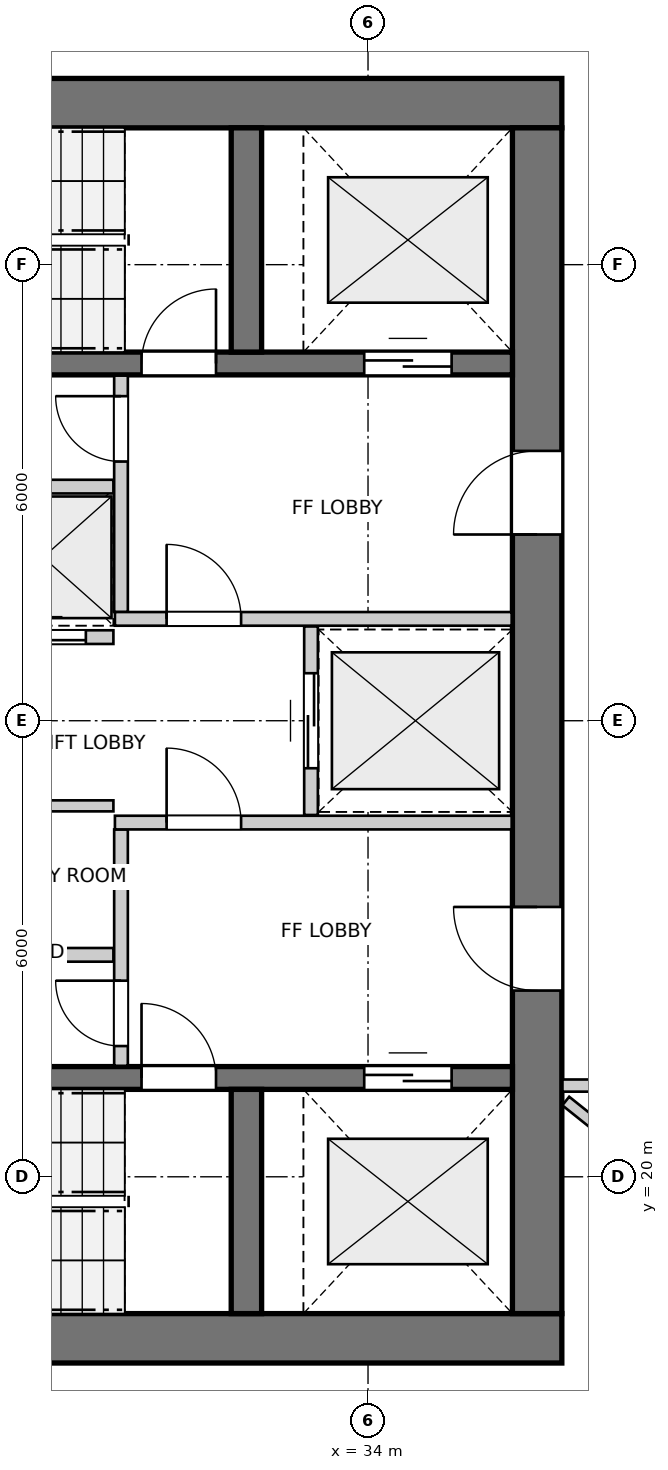
"""IFC4 building model, lengths in metres.
Left out: names, types, materials, properties, quantities, classifications, styles, units other than length and angle.
Written with IfcOpenShell. Run it as: python <this file> out.ifc"""

import sys

from ifc_helpers import new_model, si_unit, direction, frame, frame_2d, origin, place, context, subcontext, project, spatial, rectangle, extrude, source, transform, mapped, element, fill, save


model = new_model("IFC4")
c1 = context("Model", 3, precision=1e-05, world=origin(), true_north=direction((0.0, 1.0)))
c2 = subcontext(c1, "Body", "Model", "MODEL_VIEW")
j1 = project(units=[si_unit("LENGTHUNIT", "METRE"), si_unit("PLANEANGLEUNIT", "RADIAN")], contexts=[c1])
p1 = place(None, origin())
s1 = spatial("IfcSite", under=j1, at=p1, CompositionType="ELEMENT")
p2 = place(p1, origin())
s2 = spatial("IfcBuilding", under=s1, at=p2, CompositionType="ELEMENT")
p3 = place(p2, frame((0.0, 0.0, 139.4)))
s3 = spatial("IfcBuildingStorey", under=s2, at=p3, CompositionType="ELEMENT", Elevation=139.4)
for number, where, z_axis, x_axis in (
    (1, (24.15, 17.875, 0.0), (0.0, 0.0, 1.0), (1.0, 0.0, 0.0)),
    (2, (36.55, 34.125, 0.0), (0.0, 0.0, 1.0), (-1.0, 0.0, 0.0)),
):
    element("IfcWall", number, at=place(p3, frame(where, z_axis=z_axis, x_axis=x_axis)), inside=s3, PredefinedType="SHEAR", context=c2, shape_type="SweptSolid", body=[
        extrude(rectangle(XDim=12.4, YDim=0.65, at=frame_2d((6.2, 0.0))), origin(), (0.0, 0.0, 1.0), 2.95),
    ])
p4 = place(p3, frame((36.225, 18.2, 0.0), z_axis=(0.0, 0.0, 1.0), x_axis=(0.0, 1.0, 0.0)))
e3 = element("IfcWall", 3, at=p4, inside=s3, PredefinedType="SHEAR", context=c2, shape_type="SweptSolid", body=[
    extrude(rectangle(XDim=15.6, YDim=0.65, at=frame_2d((7.8, 0.0))), origin(), (0.0, 0.0, 1.0), 2.95),
])
p5 = place(p4, frame((4.25, 0.0, 0.0)))
e4 = element("IfcOpeningElement", 4, at=p5, cuts=e3, PredefinedType="OPENING", context=c2, shape_type="SweptSolid", body=[
    extrude(rectangle(XDim=1.1, YDim=2.15, at=frame_2d((0.55, 1.075))), frame((0.0, 0.335, 0.0), z_axis=(0.0, -1.0, 0.0), x_axis=(1.0, 0.0, 0.0)), (0.0, 0.0, 1.0), 0.67),
])
p6 = place(p4, frame((10.25, 0.0, 0.0)))
e5 = element("IfcOpeningElement", 5, at=p6, cuts=e3, PredefinedType="OPENING", context=c2, shape_type="SweptSolid", body=[
    extrude(rectangle(XDim=1.1, YDim=2.15, at=frame_2d((0.55, 1.075))), frame((0.0, 0.335, 0.0), z_axis=(0.0, -1.0, 0.0), x_axis=(1.0, 0.0, 0.0)), (0.0, 0.0, 1.0), 0.67),
])
p7 = place(p3, frame((24.8, 21.3, 0.0), z_axis=(0.0, 0.0, 1.0), x_axis=(1.0, 0.0, 0.0)))
e6 = element("IfcWall", 6, at=p7, inside=s3, PredefinedType="SHEAR", context=c2, shape_type="SweptSolid", body=[
    extrude(rectangle(XDim=11.1, YDim=0.3, at=frame_2d((5.55, 0.0))), origin(), (0.0, 0.0, 1.0), 2.95),
])
p8 = place(p7, frame((6.22, 0.0, 0.0)))
e7 = element("IfcOpeningElement", 7, at=p8, cuts=e6, PredefinedType="OPENING", context=c2, shape_type="SweptSolid", body=[
    extrude(rectangle(XDim=0.98, YDim=2.15, at=frame_2d((0.49, 1.075))), frame((0.0, 0.16, 0.0), z_axis=(0.0, -1.0, 0.0), x_axis=(1.0, 0.0, 0.0)), (0.0, 0.0, 1.0), 0.32),
])
p9 = place(p7, frame((9.15, 0.0, 0.0)))
e8 = element("IfcOpeningElement", 8, at=p9, cuts=e6, PredefinedType="OPENING", context=c2, shape_type="SweptSolid", body=[
    extrude(rectangle(XDim=1.15, YDim=2.15, at=frame_2d((0.575, 1.075))), frame((0.0, 0.16, 0.0), z_axis=(0.0, -1.0, 0.0), x_axis=(1.0, 0.0, 0.0)), (0.0, 0.0, 1.0), 0.32),
])
p10 = place(p3, frame((32.4, 18.2, 0.0), z_axis=(0.0, 0.0, 1.0), x_axis=(0.0, 1.0, 0.0)))
e9 = element("IfcWall", 9, at=p10, inside=s3, PredefinedType="SHEAR", context=c2, shape_type="SweptSolid", body=[
    extrude(rectangle(XDim=2.95, YDim=0.4, at=frame_2d((1.475, 0.0))), origin(), (0.0, 0.0, 1.0), 2.95),
])
p11 = place(p3, frame((24.8, 30.7, 0.0), z_axis=(0.0, 0.0, 1.0), x_axis=(1.0, 0.0, 0.0)))
e10 = element("IfcWall", 10, at=p11, inside=s3, PredefinedType="SHEAR", context=c2, shape_type="SweptSolid", body=[
    extrude(rectangle(XDim=11.1, YDim=0.3, at=frame_2d((5.55, 0.0))), origin(), (0.0, 0.0, 1.0), 2.95),
])
p12 = place(p11, frame((6.22, 0.0, 0.0)))
e11 = element("IfcOpeningElement", 11, at=p12, cuts=e10, PredefinedType="OPENING", context=c2, shape_type="SweptSolid", body=[
    extrude(rectangle(XDim=0.98, YDim=2.15, at=frame_2d((0.49, 1.075))), frame((0.0, 0.16, 0.0), z_axis=(0.0, -1.0, 0.0), x_axis=(1.0, 0.0, 0.0)), (0.0, 0.0, 1.0), 0.32),
])
p13 = place(p11, frame((9.15, 0.0, 0.0)))
e12 = element("IfcOpeningElement", 12, at=p13, cuts=e10, PredefinedType="OPENING", context=c2, shape_type="SweptSolid", body=[
    extrude(rectangle(XDim=1.15, YDim=2.15, at=frame_2d((0.575, 1.075))), frame((0.0, 0.16, 0.0), z_axis=(0.0, -1.0, 0.0), x_axis=(1.0, 0.0, 0.0)), (0.0, 0.0, 1.0), 0.32),
])
p14 = place(p3, frame((32.4, 30.85, 0.0), z_axis=(0.0, 0.0, 1.0), x_axis=(0.0, 1.0, 0.0)))
e13 = element("IfcWall", 13, at=p14, inside=s3, PredefinedType="SHEAR", context=c2, shape_type="SweptSolid", body=[
    extrude(rectangle(XDim=2.95, YDim=0.4, at=frame_2d((1.475, 0.0))), origin(), (0.0, 0.0, 1.0), 2.95),
])
p15 = place(p3, frame((30.75, 21.46, 0.0), z_axis=(0.0, 0.0, 1.0), x_axis=(0.0, 1.0, 0.0)))
e14 = element("IfcWall", 14, at=p15, inside=s3, PredefinedType="PARTITIONING", context=c2, shape_type="SweptSolid", body=[
    extrude(rectangle(XDim=3.11, YDim=0.18, at=frame_2d((1.555, 0.0))), origin(), (0.0, 0.0, 1.0), 2.95),
])
p16 = place(p15, frame((0.26, 0.0, 0.0)))
e15 = element("IfcOpeningElement", 15, at=p16, cuts=e14, PredefinedType="OPENING", context=c2, shape_type="SweptSolid", body=[
    extrude(rectangle(XDim=0.86, YDim=2.05, at=frame_2d((0.43, 1.025))), frame((0.0, 0.1, 0.0), z_axis=(0.0, -1.0, 0.0), x_axis=(1.0, 0.0, 0.0)), (0.0, 0.0, 1.0), 0.2),
])
p17 = place(p3, frame((30.67, 24.66, 0.0), z_axis=(0.0, 0.0, 1.0), x_axis=(1.0, 0.0, 0.0)))
e16 = element("IfcWall", 16, at=p17, inside=s3, PredefinedType="PARTITIONING", context=c2, shape_type="SweptSolid", body=[
    extrude(rectangle(XDim=5.22, YDim=0.18, at=frame_2d((2.61, 0.0))), origin(), (0.0, 0.0, 1.0), 2.95),
])
p18 = place(p17, frame((0.68, 0.0, 0.0)))
e17 = element("IfcOpeningElement", 17, at=p18, cuts=e16, PredefinedType="OPENING", context=c2, shape_type="SweptSolid", body=[
    extrude(rectangle(XDim=0.98, YDim=2.15, at=frame_2d((0.49, 1.075))), frame((0.0, 0.1, 0.0), z_axis=(0.0, -1.0, 0.0), x_axis=(1.0, 0.0, 0.0)), (0.0, 0.0, 1.0), 0.2),
])
p19 = place(p3, frame((30.75, 27.43, 0.0), z_axis=(0.0, 0.0, 1.0), x_axis=(0.0, 1.0, 0.0)))
e18 = element("IfcWall", 18, at=p19, inside=s3, PredefinedType="PARTITIONING", context=c2, shape_type="SweptSolid", body=[
    extrude(rectangle(XDim=3.11, YDim=0.18, at=frame_2d((1.555, 0.0))), origin(), (0.0, 0.0, 1.0), 2.95),
])
p20 = place(p19, frame((1.98, 0.0, 0.0)))
e19 = element("IfcOpeningElement", 19, at=p20, cuts=e18, PredefinedType="OPENING", context=c2, shape_type="SweptSolid", body=[
    extrude(rectangle(XDim=0.86, YDim=2.05, at=frame_2d((0.43, 1.025))), frame((0.0, 0.1, 0.0), z_axis=(0.0, -1.0, 0.0), x_axis=(1.0, 0.0, 0.0)), (0.0, 0.0, 1.0), 0.2),
])
p21 = place(p3, frame((30.67, 27.34, 0.0), z_axis=(0.0, 0.0, 1.0), x_axis=(1.0, 0.0, 0.0)))
e20 = element("IfcWall", 20, at=p21, inside=s3, PredefinedType="PARTITIONING", context=c2, shape_type="SweptSolid", body=[
    extrude(rectangle(XDim=5.22, YDim=0.18, at=frame_2d((2.61, 0.0))), origin(), (0.0, 0.0, 1.0), 2.95),
])
p22 = place(p21, frame((0.68, 0.0, 0.0)))
e21 = element("IfcOpeningElement", 21, at=p22, cuts=e20, PredefinedType="OPENING", context=c2, shape_type="SweptSolid", body=[
    extrude(rectangle(XDim=0.98, YDim=2.15, at=frame_2d((0.49, 1.075))), frame((0.0, 0.1, 0.0), z_axis=(0.0, -1.0, 0.0), x_axis=(1.0, 0.0, 0.0)), (0.0, 0.0, 1.0), 0.2),
])
p23 = place(p3, frame((33.25, 24.76, 0.0), z_axis=(0.0, 0.0, 1.0), x_axis=(0.0, 1.0, 0.0)))
e22 = element("IfcWall", 22, at=p23, inside=s3, PredefinedType="PARTITIONING", context=c2, shape_type="SweptSolid", body=[
    extrude(rectangle(XDim=2.48, YDim=0.18, at=frame_2d((1.24, 0.0))), origin(), (0.0, 0.0, 1.0), 2.95),
])
p24 = place(p23, frame((0.615, 0.0, 0.0)))
e23 = element("IfcOpeningElement", 23, at=p24, cuts=e22, PredefinedType="OPENING", context=c2, shape_type="SweptSolid", body=[
    extrude(rectangle(XDim=1.25, YDim=2.15, at=frame_2d((0.625, 1.075))), frame((0.0, 0.1, 0.0), z_axis=(0.0, -1.0, 0.0), x_axis=(1.0, 0.0, 0.0)), (0.0, 0.0, 1.0), 0.2),
])
p25 = place(p3, frame((24.81, 22.92, 0.0), z_axis=(0.0, 0.0, 1.0), x_axis=(1.0, 0.0, 0.0)))
e24 = element("IfcWall", 24, at=p25, inside=s3, PredefinedType="PARTITIONING", context=c2, shape_type="SweptSolid", body=[
    extrude(rectangle(XDim=5.84, YDim=0.18, at=frame_2d((2.92, 0.0))), origin(), (0.0, 0.0, 1.0), 2.95),
])
p26 = place(p3, frame((24.81, 24.88, 0.0), z_axis=(0.0, 0.0, 1.0), x_axis=(1.0, 0.0, 0.0)))
e25 = element("IfcWall", 25, at=p26, inside=s3, PredefinedType="PARTITIONING", context=c2, shape_type="SweptSolid", body=[
    extrude(rectangle(XDim=5.84, YDim=0.145, at=frame_2d((2.92, 0.0))), origin(), (0.0, 0.0, 1.0), 2.95),
])
p27 = place(p26, frame((2.4, 0.0, 0.0)))
e26 = element("IfcOpeningElement", 26, at=p27, cuts=e25, PredefinedType="OPENING", context=c2, shape_type="SweptSolid", body=[
    extrude(rectangle(XDim=0.96, YDim=2.1, at=frame_2d((0.48, 1.05))), frame((0.0, 0.083, 0.0), z_axis=(0.0, -1.0, 0.0), x_axis=(1.0, 0.0, 0.0)), (0.0, 0.0, 1.0), 0.165),
])
p28 = place(p3, frame((24.81, 29.08, 0.0), z_axis=(0.0, 0.0, 1.0), x_axis=(1.0, 0.0, 0.0)))
e27 = element("IfcWall", 27, at=p28, inside=s3, PredefinedType="PARTITIONING", context=c2, shape_type="SweptSolid", body=[
    extrude(rectangle(XDim=5.84, YDim=0.18, at=frame_2d((2.92, 0.0))), origin(), (0.0, 0.0, 1.0), 2.95),
])
p29 = place(p3, frame((28.825, 27.1, 0.0), z_axis=(0.0, 0.0, 1.0), x_axis=(1.0, 0.0, 0.0)))
e28 = element("IfcWall", 28, at=p29, inside=s3, PredefinedType="PARTITIONING", context=c2, shape_type="SweptSolid", body=[
    extrude(rectangle(XDim=1.825, YDim=0.18, at=frame_2d((0.913, 0.0))), origin(), (0.0, 0.0, 1.0), 2.95),
])
p30 = place(p29, frame((0.363, 0.0, 0.0)))
e29 = element("IfcOpeningElement", 29, at=p30, cuts=e28, PredefinedType="OPENING", context=c2, shape_type="SweptSolid", body=[
    extrude(rectangle(XDim=1.1, YDim=2.15, at=frame_2d((0.55, 1.075))), frame((0.0, 0.1, 0.0), z_axis=(0.0, -1.0, 0.0), x_axis=(1.0, 0.0, 0.0)), (0.0, 0.0, 1.0), 0.2),
])
p31 = place(p3, frame((36.602, 20.997, 0.0), z_axis=(0.0, 0.0, 1.0), x_axis=(0.780696683128, -0.624910144703, 0.0)))
e30 = element("IfcWall", 30, at=p31, inside=s3, PredefinedType="PARTITIONING", context=c2, shape_type="SweptSolid", body=[
    extrude(rectangle(XDim=7.474, YDim=0.145, at=frame_2d((3.737, 0.0))), origin(), (0.0, 0.0, 1.0), 2.95),
])
p32 = place(p3, frame((36.558, 21.2, 0.0), z_axis=(0.0, 0.0, 1.0), x_axis=(1.0, 0.0, 0.0)))
e31 = element("IfcWall", 31, at=p32, inside=s3, PredefinedType="PARTITIONING", context=c2, shape_type="SweptSolid", body=[
    extrude(rectangle(XDim=1.684, YDim=0.16, at=frame_2d((0.842, 0.0))), origin(), (0.0, 0.0, 1.0), 2.95),
])
m1 = source(origin(), c2, "Body", "SweptSolid", [
    extrude(rectangle(XDim=0.98, YDim=2.15, at=frame_2d((0.49, 1.075))), frame((0.0, 0.025, 0.0), z_axis=(0.0, -1.0, 0.0), x_axis=(1.0, 0.0, 0.0)), (0.0, 0.0, 1.0), 0.05),
])
p33 = place(p8, origin())
e32 = element("IfcDoor", 32, at=p33, inside=s3, OperationType="SINGLE_SWING_LEFT", PredefinedType="DOOR", context=c2, shape_type="MappedRepresentation", body=[
    mapped(m1, transform((0.0, 0.0, 0.0), x_axis=(1.0, 0.0, 0.0), y_axis=(0.0, 1.0, 0.0), z_axis=(0.0, 0.0, 1.0), scale=1.0)),
])
fill(e7, e32)
m2 = source(origin(), c2, "Body", "SweptSolid", [
    extrude(rectangle(XDim=1.15, YDim=2.15, at=frame_2d((0.575, 1.075))), frame((0.0, 0.025, 0.0), z_axis=(0.0, -1.0, 0.0), x_axis=(1.0, 0.0, 0.0)), (0.0, 0.0, 1.0), 0.05),
])
p34 = place(p9, origin())
e33 = element("IfcDoor", 33, at=p34, inside=s3, OperationType="DOUBLE_DOOR_SLIDING", PredefinedType="DOOR", context=c2, shape_type="MappedRepresentation", body=[
    mapped(m2, transform((0.0, 0.0, 0.0), x_axis=(1.0, 0.0, 0.0), y_axis=(0.0, 1.0, 0.0), z_axis=(0.0, 0.0, 1.0), scale=1.0)),
])
fill(e8, e33)
p35 = place(p12, origin())
e34 = element("IfcDoor", 34, at=p35, inside=s3, OperationType="SINGLE_SWING_RIGHT", PredefinedType="DOOR", context=c2, shape_type="MappedRepresentation", body=[
    mapped(m1, transform((0.0, 0.0, 0.0), x_axis=(1.0, 0.0, 0.0), y_axis=(0.0, 1.0, 0.0), z_axis=(0.0, 0.0, 1.0), scale=1.0)),
])
fill(e11, e34)
p36 = place(p13, origin())
e35 = element("IfcDoor", 35, at=p36, inside=s3, OperationType="DOUBLE_DOOR_SLIDING", PredefinedType="DOOR", context=c2, shape_type="MappedRepresentation", body=[
    mapped(m2, transform((0.0, 0.0, 0.0), x_axis=(1.0, 0.0, 0.0), y_axis=(0.0, 1.0, 0.0), z_axis=(0.0, 0.0, 1.0), scale=1.0)),
])
fill(e12, e35)
m3 = source(origin(), c2, "Body", "SweptSolid", [
    extrude(rectangle(XDim=1.1, YDim=2.15, at=frame_2d((0.55, 1.075))), frame((0.0, 0.025, 0.0), z_axis=(0.0, -1.0, 0.0), x_axis=(1.0, 0.0, 0.0)), (0.0, 0.0, 1.0), 0.05),
])
p37 = place(p5, origin())
e36 = element("IfcDoor", 36, at=p37, inside=s3, OperationType="SINGLE_SWING_RIGHT", PredefinedType="DOOR", context=c2, shape_type="MappedRepresentation", body=[
    mapped(m3, transform((0.0, 0.0, 0.0), x_axis=(1.0, 0.0, 0.0), y_axis=(0.0, 1.0, 0.0), z_axis=(0.0, 0.0, 1.0), scale=1.0)),
])
fill(e4, e36)
p38 = place(p6, origin())
e37 = element("IfcDoor", 37, at=p38, inside=s3, OperationType="SINGLE_SWING_LEFT", PredefinedType="DOOR", context=c2, shape_type="MappedRepresentation", body=[
    mapped(m3, transform((0.0, 0.0, 0.0), x_axis=(1.0, 0.0, 0.0), y_axis=(0.0, 1.0, 0.0), z_axis=(0.0, 0.0, 1.0), scale=1.0)),
])
fill(e5, e37)
m4 = source(origin(), c2, "Body", "SweptSolid", [
    extrude(rectangle(XDim=0.86, YDim=2.05, at=frame_2d((0.43, 1.025))), frame((0.0, 0.025, 0.0), z_axis=(0.0, -1.0, 0.0), x_axis=(1.0, 0.0, 0.0)), (0.0, 0.0, 1.0), 0.05),
])
p39 = place(p16, origin())
e38 = element("IfcDoor", 38, at=p39, inside=s3, OperationType="SINGLE_SWING_RIGHT", PredefinedType="DOOR", context=c2, shape_type="MappedRepresentation", body=[
    mapped(m4, transform((0.0, 0.0, 0.0), x_axis=(1.0, 0.0, 0.0), y_axis=(0.0, 1.0, 0.0), z_axis=(0.0, 0.0, 1.0), scale=1.0)),
])
fill(e15, e38)
p40 = place(p18, origin())
e39 = element("IfcDoor", 39, at=p40, inside=s3, OperationType="SINGLE_SWING_LEFT", PredefinedType="DOOR", context=c2, shape_type="MappedRepresentation", body=[
    mapped(m1, transform((0.0, 0.0, 0.0), x_axis=(1.0, 0.0, 0.0), y_axis=(0.0, 1.0, 0.0), z_axis=(0.0, 0.0, 1.0), scale=1.0)),
])
fill(e17, e39)
p41 = place(p20, origin())
e40 = element("IfcDoor", 40, at=p41, inside=s3, OperationType="SINGLE_SWING_RIGHT", PredefinedType="DOOR", context=c2, shape_type="MappedRepresentation", body=[
    mapped(m4, transform((0.0, 0.0, 0.0), x_axis=(1.0, 0.0, 0.0), y_axis=(0.0, 1.0, 0.0), z_axis=(0.0, 0.0, 1.0), scale=1.0)),
])
fill(e19, e40)
p42 = place(p22, origin())
e41 = element("IfcDoor", 41, at=p42, inside=s3, OperationType="SINGLE_SWING_LEFT", PredefinedType="DOOR", context=c2, shape_type="MappedRepresentation", body=[
    mapped(m1, transform((0.0, 0.0, 0.0), x_axis=(1.0, 0.0, 0.0), y_axis=(0.0, 1.0, 0.0), z_axis=(0.0, 0.0, 1.0), scale=1.0)),
])
fill(e21, e41)
m5 = source(origin(), c2, "Body", "SweptSolid", [
    extrude(rectangle(XDim=1.25, YDim=2.15, at=frame_2d((0.625, 1.075))), frame((0.0, 0.025, 0.0), z_axis=(0.0, -1.0, 0.0), x_axis=(1.0, 0.0, 0.0)), (0.0, 0.0, 1.0), 0.05),
])
p43 = place(p24, origin())
e42 = element("IfcDoor", 42, at=p43, inside=s3, OperationType="DOUBLE_DOOR_SLIDING", PredefinedType="DOOR", context=c2, shape_type="MappedRepresentation", body=[
    mapped(m5, transform((0.0, 0.0, 0.0), x_axis=(1.0, 0.0, 0.0), y_axis=(0.0, 1.0, 0.0), z_axis=(0.0, 0.0, 1.0), scale=1.0)),
])
fill(e23, e42)
p44 = place(p30, origin())
e43 = element("IfcDoor", 43, at=p44, inside=s3, OperationType="DOUBLE_DOOR_SLIDING", PredefinedType="DOOR", context=c2, shape_type="MappedRepresentation", body=[
    mapped(m3, transform((0.0, 0.0, 0.0), x_axis=(1.0, 0.0, 0.0), y_axis=(0.0, 1.0, 0.0), z_axis=(0.0, 0.0, 1.0), scale=1.0)),
])
fill(e29, e43)
save(model, sys.argv[1])
